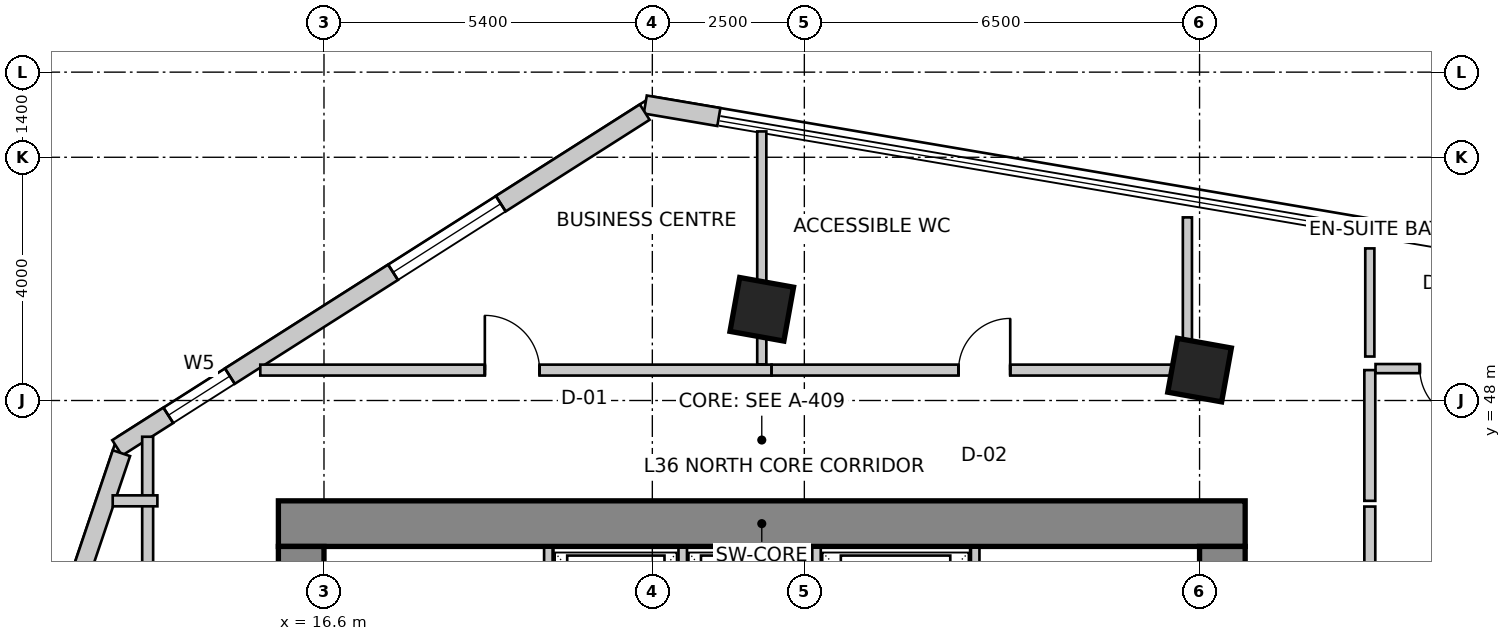
"""IFC4 building model, lengths in metres.
Left out: names, types, materials, properties, quantities, classifications, styles, units other than length and angle.
Written with IfcOpenShell. Run it as: python <this file> out.ifc"""

import sys

from ifc_helpers import new_model, si_unit, direction, frame, frame_2d, origin, origin_2d, place, context, subcontext, project, spatial, rectangle, extrude, source, transform, mapped, element, fill, save


model = new_model("IFC4")
c1 = context("Model", 3, precision=1e-05, world=origin(), true_north=direction((0.0, 1.0)))
c2 = subcontext(c1, "Body", "Model", "MODEL_VIEW")
j1 = project(units=[si_unit("LENGTHUNIT", "METRE"), si_unit("PLANEANGLEUNIT", "RADIAN")], contexts=[c1])
p1 = place(None, origin())
s1 = spatial("IfcSite", under=j1, at=p1, CompositionType="ELEMENT")
p2 = place(p1, origin())
s2 = spatial("IfcBuilding", under=s1, at=p2, CompositionType="ELEMENT")
p3 = place(p2, frame((0.0, 0.0, 146.6)))
s3 = spatial("IfcBuildingStorey", under=s2, at=p3, CompositionType="ELEMENT", Elevation=146.6)
p4 = place(p3, frame((15.85, 45.975, 0.0), z_axis=(0.0, 0.0, 1.0), x_axis=(1.0, 0.0, 0.0)))
e1 = element("IfcWall", 1, at=p4, inside=s3, PredefinedType="SHEAR", context=c2, shape_type="SweptSolid", body=[
    extrude(rectangle(XDim=15.9, YDim=0.75, at=frame_2d((7.95, 0.0))), origin(), (0.0, 0.0, 1.0), 3.6),
])
p5 = place(p3, frame((16.225, 34.2, 0.0), z_axis=(0.0, 0.0, 1.0), x_axis=(0.0, 1.0, 0.0)))
e2 = element("IfcWall", 2, at=p5, inside=s3, PredefinedType="SHEAR", context=c2, shape_type="SweptSolid", body=[
    extrude(rectangle(XDim=11.4, YDim=0.75, at=frame_2d((5.7, 0.0))), origin(), (0.0, 0.0, 1.0), 3.6),
])
m1 = source(origin(), c2, "Body", "SweptSolid", [
    extrude(rectangle(XDim=1.1, YDim=2.15, at=frame_2d((0.55, 1.075))), frame((0.0, 0.385, 0.0), z_axis=(0.0, -1.0, 0.0), x_axis=(1.0, 0.0, 0.0)), (0.0, 0.0, 1.0), 0.77),
])
p6 = place(p5, frame((7.15, 0.0, 0.0)))
e3 = element("IfcOpeningElement", 3, at=p6, cuts=e2, PredefinedType="OPENING", context=c2, shape_type="MappedRepresentation", body=[
    mapped(m1, transform((0.0, 0.0, 0.0), scale=1.0)),
])
p7 = place(p3, frame((31.375, 34.2, 0.0), z_axis=(0.0, 0.0, 1.0), x_axis=(0.0, 1.0, 0.0)))
e4 = element("IfcWall", 4, at=p7, inside=s3, PredefinedType="SHEAR", context=c2, shape_type="SweptSolid", body=[
    extrude(rectangle(XDim=11.4, YDim=0.75, at=frame_2d((5.7, 0.0))), origin(), (0.0, 0.0, 1.0), 3.6),
])
p8 = place(p7, frame((7.35, 0.0, 0.0)))
e5 = element("IfcOpeningElement", 5, at=p8, cuts=e4, PredefinedType="OPENING", context=c2, shape_type="MappedRepresentation", body=[
    mapped(m1, transform((0.0, 0.0, 0.0), scale=1.0)),
])
m2 = source(origin(), c2, "Body", "SweptSolid", [
    extrude(rectangle(XDim=0.9, YDim=0.9, at=origin_2d()), origin(), (0.0, 0.0, 1.0), 3.6),
])
for number, where, z_axis, x_axis in (
    (6, (23.8, 49.5, 0.0), (0.0, 0.0, 1.0), (0.984, -0.177, 0.0)),
    (7, (31.0, 48.5, 0.0), (0.0, 0.0, 1.0), (0.984, -0.177, 0.0)),
):
    element("IfcColumn", number, at=place(p3, frame(where, z_axis=z_axis, x_axis=x_axis)), inside=s3, PredefinedType="COLUMN", context=c2, shape_type="MappedRepresentation", body=[
        mapped(m2, transform((0.0, 0.0, 0.0), scale=1.0)),
    ])
p9 = place(p3, frame((23.094, 52.662, 0.0), z_axis=(0.0, 0.0, 1.0), x_axis=(-0.985845658291, 0.167655414553, 0.0)))
e8 = element("IfcWall", 8, at=p9, inside=s3, PredefinedType="SOLIDWALL", context=c2, shape_type="SweptSolid", body=[
    extrude(rectangle(XDim=1.228, YDim=0.3, at=frame_2d((0.614, 0.0))), origin(), (0.0, 0.0, 1.0), 3.35),
])
p10 = place(p3, frame((21.875, 52.742, 0.0), z_axis=(0.0, 0.0, 1.0), x_axis=(-0.843662465249, -0.536873956092, 0.0)))
e9 = element("IfcWall", 9, at=p10, inside=s3, PredefinedType="SOLIDWALL", context=c2, shape_type="SweptSolid", body=[
    extrude(rectangle(XDim=10.284, YDim=0.3, at=frame_2d((5.142, 0.0))), origin(), (0.0, 0.0, 1.0), 3.35),
])
m3 = source(origin(), c2, "Body", "SweptSolid", [
    extrude(rectangle(XDim=2.1, YDim=2.0, at=frame_2d((1.05, 1.0))), frame((0.0, 0.16, 0.0), z_axis=(0.0, -1.0, 0.0), x_axis=(1.0, 0.0, 0.0)), (0.0, 0.0, 1.0), 0.32),
])
p11 = place(p10, frame((2.806, 0.0, 0.85)))
e10 = element("IfcOpeningElement", 10, at=p11, cuts=e9, PredefinedType="OPENING", context=c2, shape_type="MappedRepresentation", body=[
    mapped(m3, transform((0.0, 0.0, 0.0), scale=1.0)),
])
m4 = source(origin(), c2, "Body", "SweptSolid", [
    extrude(rectangle(XDim=1.2, YDim=1.6, at=frame_2d((0.6, 0.8))), frame((0.0, 0.16, 0.0), z_axis=(0.0, -1.0, 0.0), x_axis=(1.0, 0.0, 0.0)), (0.0, 0.0, 1.0), 0.32),
])
p12 = place(p10, frame((8.087, 0.0, 0.85)))
e11 = element("IfcOpeningElement", 11, at=p12, cuts=e9, PredefinedType="OPENING", context=c2, shape_type="MappedRepresentation", body=[
    mapped(m4, transform((0.0, 0.0, 0.0), scale=1.0)),
])
p13 = place(p3, frame((13.269, 47.134, 0.0), z_axis=(0.0, 0.0, 1.0), x_axis=(-0.319929773322, -0.947441259468, 0.0)))
e12 = element("IfcWall", 12, at=p13, inside=s3, PredefinedType="SOLIDWALL", context=c2, shape_type="SweptSolid", body=[
    extrude(rectangle(XDim=16.134, YDim=0.3, at=frame_2d((8.067, 0.0))), origin(), (0.0, 0.0, 1.0), 3.35),
])
m5 = source(origin(), c2, "Body", "SweptSolid", [
    extrude(rectangle(XDim=2.4, YDim=2.2, at=frame_2d((1.2, 1.1))), frame((0.0, 0.16, 0.0), z_axis=(0.0, -1.0, 0.0), x_axis=(1.0, 0.0, 0.0)), (0.0, 0.0, 1.0), 0.32),
])
p14 = place(p13, frame((2.276, 0.0, 0.85)))
e13 = element("IfcOpeningElement", 13, at=p14, cuts=e12, PredefinedType="OPENING", context=c2, shape_type="MappedRepresentation", body=[
    mapped(m5, transform((0.0, 0.0, 0.0), scale=1.0)),
])
p15 = place(p13, frame((7.361, 0.0, 0.85)))
e14 = element("IfcOpeningElement", 14, at=p15, cuts=e12, PredefinedType="OPENING", context=c2, shape_type="MappedRepresentation", body=[
    mapped(m3, transform((0.0, 0.0, 0.0), scale=1.0)),
])
p16 = place(p13, frame((12.146, 0.0, 0.85)))
e15 = element("IfcOpeningElement", 15, at=p16, cuts=e12, PredefinedType="OPENING", context=c2, shape_type="MappedRepresentation", body=[
    mapped(m5, transform((0.0, 0.0, 0.0), scale=1.0)),
])
for number, where, z_axis, x_axis in (
    (16, (20.29, 43.28, 0.0), (0.0, 0.0, 1.0), (0.0, 1.0, 0.0)),
    (17, (27.31, 43.28, 0.0), (0.0, 0.0, 1.0), (0.0, 1.0, 0.0)),
):
    element("IfcWall", number, at=place(p3, frame(where, z_axis=z_axis, x_axis=x_axis)), inside=s3, PredefinedType="SOLIDWALL", context=c2, shape_type="SweptSolid", body=[
        extrude(rectangle(XDim=2.3, YDim=0.14, at=frame_2d((1.15, 0.0))), origin(), (0.0, 0.0, 1.0), 3.35),
    ])
for number, where, z_axis, x_axis in (
    (18, (22.5, 43.02, 0.0), (0.0, 0.0, 1.0), (0.0, 1.0, 0.0)),
    (19, (24.7, 43.02, 0.0), (0.0, 0.0, 1.0), (0.0, 1.0, 0.0)),
):
    element("IfcWall", number, at=place(p3, frame(where, z_axis=z_axis, x_axis=x_axis)), inside=s3, PredefinedType="SOLIDWALL", context=c2, shape_type="SweptSolid", body=[
        extrude(rectangle(XDim=2.56, YDim=0.14, at=frame_2d((1.28, 0.0))), origin(), (0.0, 0.0, 1.0), 3.35),
    ])
p17 = place(p3, frame((13.7, 33.544, 0.0), z_axis=(0.0, 0.0, 1.0), x_axis=(0.0, 1.0, 0.0)))
e20 = element("IfcWall", 20, at=p17, inside=s3, PredefinedType="PARTITIONING", context=c2, shape_type="SweptSolid", body=[
    extrude(rectangle(XDim=13.86, YDim=0.18, at=frame_2d((6.93, 0.0))), origin(), (0.0, 0.0, 1.0), 2.492),
])
m6 = source(origin(), c2, "Body", "SweptSolid", [
    extrude(rectangle(XDim=0.9, YDim=2.15, at=frame_2d((0.45, 1.075))), frame((0.0, 0.1, 0.0), z_axis=(0.0, -1.0, 0.0), x_axis=(1.0, 0.0, 0.0)), (0.0, 0.0, 1.0), 0.2),
])
p18 = place(p17, frame((4.253, 0.0, 0.0)))
e21 = element("IfcOpeningElement", 21, at=p18, cuts=e20, PredefinedType="OPENING", context=c2, shape_type="MappedRepresentation", body=[
    mapped(m6, transform((0.0, 0.0, 0.0), scale=1.0)),
])
p19 = place(p3, frame((13.86, 46.35, 0.0), z_axis=(0.0, 0.0, 1.0), x_axis=(-1.0, 0.0, 0.0)))
e22 = element("IfcWall", 22, at=p19, inside=s3, PredefinedType="PARTITIONING", context=c2, shape_type="SweptSolid", body=[
    extrude(rectangle(XDim=0.735, YDim=0.18, at=frame_2d((0.367, 0.0))), origin(), (0.0, 0.0, 1.0), 3.35),
])
p20 = place(p3, frame((15.552, 48.5, 0.0), z_axis=(0.0, 0.0, 1.0), x_axis=(1.0, 0.0, 0.0)))
e23 = element("IfcWall", 23, at=p20, inside=s3, PredefinedType="PARTITIONING", context=c2, shape_type="SweptSolid", body=[
    extrude(rectangle(XDim=8.407, YDim=0.18, at=frame_2d((4.204, 0.0))), origin(), (0.0, 0.0, 1.0), 2.935),
])
p21 = place(p20, frame((3.693, 0.0, 0.0)))
e24 = element("IfcOpeningElement", 24, at=p21, cuts=e23, PredefinedType="OPENING", context=c2, shape_type="MappedRepresentation", body=[
    mapped(m6, transform((0.0, 0.0, 0.0), scale=1.0)),
])
p22 = place(p3, frame((23.962, 48.5, 0.0), z_axis=(0.0, 0.0, 1.0), x_axis=(1.0, 0.0, 0.0)))
e25 = element("IfcWall", 25, at=p22, inside=s3, PredefinedType="PARTITIONING", context=c2, shape_type="SweptSolid", body=[
    extrude(rectangle(XDim=6.998, YDim=0.18, at=frame_2d((3.499, 0.0))), origin(), (0.0, 0.0, 1.0), 2.492),
])
m7 = source(origin(), c2, "Body", "SweptSolid", [
    extrude(rectangle(XDim=0.85, YDim=2.15, at=frame_2d((0.425, 1.075))), frame((0.0, 0.1, 0.0), z_axis=(0.0, -1.0, 0.0), x_axis=(1.0, 0.0, 0.0)), (0.0, 0.0, 1.0), 0.2),
])
p23 = place(p22, frame((3.074, 0.0, 0.0)))
e26 = element("IfcOpeningElement", 26, at=p23, cuts=e25, PredefinedType="OPENING", context=c2, shape_type="MappedRepresentation", body=[
    mapped(m7, transform((0.0, 0.0, 0.0), scale=1.0)),
])
p24 = place(p3, frame((33.8, 48.5, 0.0), z_axis=(0.0, 0.0, 1.0), x_axis=(0.0, -1.0, 0.0)))
e27 = element("IfcWall", 27, at=p24, inside=s3, PredefinedType="PARTITIONING", context=c2, shape_type="SweptSolid", body=[
    extrude(rectangle(XDim=2.15, YDim=0.18, at=frame_2d((1.075, 0.0))), origin(), (0.0, 0.0, 1.0), 2.492),
])
p25 = place(p3, frame((33.8, 46.256, 0.0), z_axis=(0.0, 0.0, 1.0), x_axis=(0.0, -1.0, 0.0)))
e28 = element("IfcWall", 28, at=p25, inside=s3, PredefinedType="PARTITIONING", context=c2, shape_type="SweptSolid", body=[
    extrude(rectangle(XDim=8.416, YDim=0.18, at=frame_2d((4.208, 0.0))), origin(), (0.0, 0.0, 1.0), 2.788),
])
p26 = place(p3, frame((23.8, 52.425, 0.0), z_axis=(0.0, 0.0, 1.0), x_axis=(0.0, -1.0, 0.0)))
e29 = element("IfcWall", 29, at=p26, inside=s3, PredefinedType="PARTITIONING", context=c2, shape_type="SweptSolid", body=[
    extrude(rectangle(XDim=3.831, YDim=0.15, at=frame_2d((1.916, 0.0))), origin(), (0.0, 0.0, 1.0), 2.492),
])
p27 = place(p3, frame((36.2, 48.524, 0.0), z_axis=(0.0, 0.0, 1.0), x_axis=(-1.0, 0.0, 0.0)))
e30 = element("IfcWall", 30, at=p27, inside=s3, PredefinedType="PARTITIONING", context=c2, shape_type="SweptSolid", body=[
    extrude(rectangle(XDim=2.306, YDim=0.15, at=frame_2d((1.153, 0.0))), origin(), (0.0, 0.0, 1.0), 3.35),
])
m8 = source(origin(), c2, "Body", "SweptSolid", [
    extrude(rectangle(XDim=0.85, YDim=2.15, at=frame_2d((0.425, 1.075))), frame((0.0, 0.085, 0.0), z_axis=(0.0, -1.0, 0.0), x_axis=(1.0, 0.0, 0.0)), (0.0, 0.0, 1.0), 0.17),
])
p28 = place(p27, frame((0.728, 0.0, 0.0)))
e31 = element("IfcOpeningElement", 31, at=p28, cuts=e30, PredefinedType="OPENING", context=c2, shape_type="MappedRepresentation", body=[
    mapped(m8, transform((0.0, 0.0, 0.0), scale=1.0)),
])
p29 = place(p3, frame((30.8, 51.011, 0.0), z_axis=(0.0, 0.0, 1.0), x_axis=(0.0, -1.0, 0.0)))
e32 = element("IfcWall", 32, at=p29, inside=s3, PredefinedType="PARTITIONING", context=c2, shape_type="SweptSolid", body=[
    extrude(rectangle(XDim=2.292, YDim=0.15, at=frame_2d((1.146, 0.0))), origin(), (0.0, 0.0, 1.0), 3.35),
])
p30 = place(p3, frame((33.8, 48.723, 0.0), z_axis=(0.0, 0.0, 1.0), x_axis=(0.0, 1.0, 0.0)))
e33 = element("IfcWall", 33, at=p30, inside=s3, PredefinedType="PARTITIONING", context=c2, shape_type="SweptSolid", body=[
    extrude(rectangle(XDim=1.778, YDim=0.15, at=frame_2d((0.889, 0.0))), origin(), (0.0, 0.0, 1.0), 3.35),
])
m9 = source(origin(), c2, "Body", "SweptSolid", [
    extrude(rectangle(XDim=2.1, YDim=2.0, at=frame_2d((1.05, 1.0))), frame((0.0, -0.015, 0.0), z_axis=(0.0, -1.0, 0.0), x_axis=(1.0, 0.0, 0.0)), (0.0, 0.0, 1.0), 0.06),
])
p31 = place(p11, origin())
e34 = element("IfcWindow", 34, at=p31, inside=s3, PartitioningType="SINGLE_PANEL", PredefinedType="WINDOW", context=c2, shape_type="MappedRepresentation", body=[
    mapped(m9, transform((0.0, 0.0, 0.0), scale=1.0)),
])
fill(e10, e34)
m10 = source(origin(), c2, "Body", "SweptSolid", [
    extrude(rectangle(XDim=1.2, YDim=1.6, at=frame_2d((0.6, 0.8))), frame((0.0, -0.015, 0.0), z_axis=(0.0, -1.0, 0.0), x_axis=(1.0, 0.0, 0.0)), (0.0, 0.0, 1.0), 0.06),
])
p32 = place(p12, origin())
e35 = element("IfcWindow", 35, at=p32, inside=s3, PartitioningType="SINGLE_PANEL", PredefinedType="WINDOW", context=c2, shape_type="MappedRepresentation", body=[
    mapped(m10, transform((0.0, 0.0, 0.0), scale=1.0)),
])
fill(e11, e35)
m11 = source(origin(), c2, "Body", "SweptSolid", [
    extrude(rectangle(XDim=0.9, YDim=2.15, at=frame_2d((0.45, 1.075))), frame((0.0, 0.025, 0.0), z_axis=(0.0, -1.0, 0.0), x_axis=(1.0, 0.0, 0.0)), (0.0, 0.0, 1.0), 0.05),
])
p33 = place(p21, origin())
e36 = element("IfcDoor", 36, at=p33, inside=s3, OperationType="SINGLE_SWING_LEFT", PredefinedType="DOOR", context=c2, shape_type="MappedRepresentation", body=[
    mapped(m11, transform((0.0, 0.0, 0.0), scale=1.0)),
])
fill(e24, e36)
m12 = source(origin(), c2, "Body", "SweptSolid", [
    extrude(rectangle(XDim=0.85, YDim=2.15, at=frame_2d((0.425, 1.075))), frame((0.0, 0.025, 0.0), z_axis=(0.0, -1.0, 0.0), x_axis=(1.0, 0.0, 0.0)), (0.0, 0.0, 1.0), 0.05),
])
p34 = place(p23, origin())
e37 = element("IfcDoor", 37, at=p34, inside=s3, OperationType="SINGLE_SWING_RIGHT", PredefinedType="DOOR", context=c2, shape_type="MappedRepresentation", body=[
    mapped(m12, transform((0.0, 0.0, 0.0), scale=1.0)),
])
fill(e26, e37)
p35 = place(p28, origin())
e38 = element("IfcDoor", 38, at=p35, inside=s3, OperationType="SINGLE_SWING_LEFT", PredefinedType="DOOR", context=c2, shape_type="MappedRepresentation", body=[
    mapped(m12, transform((0.0, 0.0, 0.0), scale=1.0)),
])
fill(e31, e38)
save(model, sys.argv[1])
